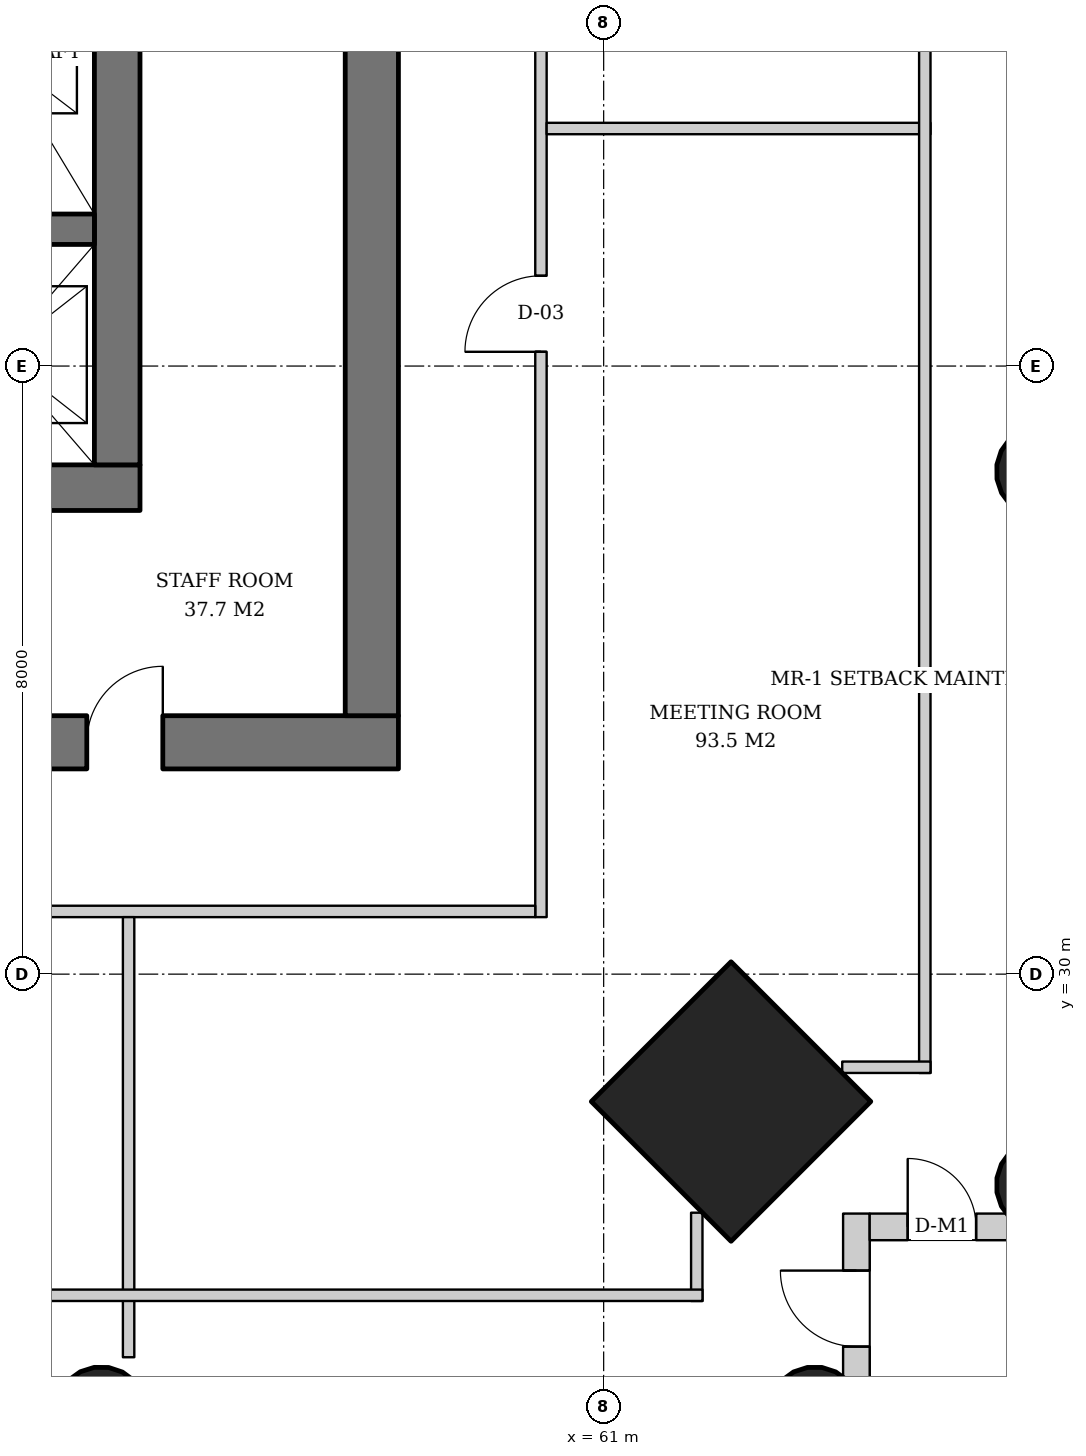
"""IFC4 building model, lengths in metres.
Left out: names, types, materials, properties, quantities, classifications, styles, units other than length and angle.
Written with IfcOpenShell. Run it as: python <this file> out.ifc"""

import sys

from ifc_helpers import new_model, si_unit, direction, frame, frame_2d, origin, origin_2d, place, context, subcontext, project, spatial, rectangle, hollow_circle, extrude, element, fill, save


model = new_model("IFC4")
c1 = context("Model", 3, precision=1e-05, world=origin(), true_north=direction((0.0, 1.0)))
c2 = subcontext(c1, "Body", "Model", "MODEL_VIEW")
j1 = project(units=[si_unit("LENGTHUNIT", "METRE"), si_unit("PLANEANGLEUNIT", "RADIAN")], contexts=[c1])
p1 = place(None, origin())
s1 = spatial("IfcSite", under=j1, at=p1, CompositionType="ELEMENT")
p2 = place(p1, origin())
s2 = spatial("IfcBuilding", under=s1, at=p2, CompositionType="ELEMENT")
p3 = place(p2, frame((0.0, 0.0, 89.4)))
s3 = spatial("IfcBuildingStorey", under=s2, at=p3, CompositionType="ELEMENT", Elevation=89.4)
p4 = place(p3, frame((66.814, 27.186, 0.0), z_axis=(-0.031898107953, 0.031898107953, 0.998981992539), x_axis=(-0.707106781187, -0.707106781187, 0.0)))
e1 = element("IfcColumn", 1, at=p4, inside=s3, PredefinedType="COLUMN", context=c2, shape_type="SweptSolid", body=[
    extrude(hollow_circle(Radius=0.61, WallThickness=0.04, at=origin_2d()), origin(), (0.0, 0.0, 1.0), 3.804),
])
p5 = place(p3, frame((66.814, 36.593, 0.0), z_axis=(-0.031910269556, 0.015987237665, 0.999362868496), x_axis=(-0.447933021895, -0.894067115991, 0.0)))
e2 = element("IfcColumn", 2, at=p5, inside=s3, PredefinedType="COLUMN", context=c2, shape_type="SweptSolid", body=[
    extrude(hollow_circle(Radius=0.61, WallThickness=0.04, at=origin_2d()), origin(), (0.0, 0.0, 1.0), 3.802),
])
p6 = place(p3, frame((62.714, 28.286, 0.0), z_axis=(-0.031962158256, 0.031962158256, 0.998977898093), x_axis=(-0.707106781187, -0.707106781187, 0.0)))
e3 = element("IfcColumn", 3, at=p6, inside=s3, PredefinedType="COLUMN", context=c2, shape_type="SweptSolid", body=[
    extrude(rectangle(XDim=2.6, YDim=2.6, at=origin_2d()), origin(), (0.0, 0.0, 1.0), 3.804),
])
p7 = place(p3, frame((63.814, 24.186, 0.0), z_axis=(-0.031898107953, 0.031898107953, 0.998981992539), x_axis=(-0.707106781187, -0.707106781187, 0.0)))
e4 = element("IfcColumn", 4, at=p7, inside=s3, PredefinedType="COLUMN", context=c2, shape_type="SweptSolid", body=[
    extrude(hollow_circle(Radius=0.61, WallThickness=0.04, at=origin_2d()), origin(), (0.0, 0.0, 1.0), 3.804),
])
p8 = place(p3, frame((54.407, 24.186, 0.0), z_axis=(-0.015987237665, 0.031910269556, 0.999362868496), x_axis=(-0.894067115991, -0.447933021895, 0.0)))
e5 = element("IfcColumn", 5, at=p8, inside=s3, PredefinedType="COLUMN", context=c2, shape_type="SweptSolid", body=[
    extrude(hollow_circle(Radius=0.61, WallThickness=0.04, at=origin_2d()), origin(), (0.0, 0.0, 1.0), 3.802),
])
p9 = place(p3, frame((35.1, 36.4, 0.0), z_axis=(0.0, 0.0, 1.0), x_axis=(1.0, 0.0, 0.0)))
e6 = element("IfcWall", 6, at=p9, inside=s3, PredefinedType="SHEAR", context=c2, shape_type="SweptSolid", body=[
    extrude(rectangle(XDim=19.8, YDim=0.6, at=frame_2d((9.9, 0.0))), origin(), (0.0, 0.0, 1.0), 3.8),
])
p10 = place(p9, frame((3.9, 0.0, 0.0)))
e7 = element("IfcOpeningElement", 7, at=p10, cuts=e6, PredefinedType="OPENING", context=c2, shape_type="SweptSolid", body=[
    extrude(rectangle(XDim=1.0, YDim=2.1, at=frame_2d((0.5, 1.05))), frame((0.0, 0.31, 0.0), z_axis=(0.0, -1.0, 0.0), x_axis=(1.0, 0.0, 0.0)), (0.0, 0.0, 1.0), 0.62),
])
p11 = place(p9, frame((15.35, 0.0, 0.0)))
e8 = element("IfcOpeningElement", 8, at=p11, cuts=e6, PredefinedType="OPENING", context=c2, shape_type="SweptSolid", body=[
    extrude(rectangle(XDim=1.0, YDim=2.1, at=frame_2d((0.5, 1.05))), frame((0.0, 0.31, 0.0), z_axis=(0.0, -1.0, 0.0), x_axis=(1.0, 0.0, 0.0)), (0.0, 0.0, 1.0), 0.62),
])
p12 = place(p3, frame((54.6, 36.7, 0.0), z_axis=(0.0, 0.0, 1.0), x_axis=(0.0, 1.0, 0.0)))
e9 = element("IfcWall", 9, at=p12, inside=s3, PredefinedType="SHEAR", context=c2, shape_type="SweptSolid", body=[
    extrude(rectangle(XDim=18.6, YDim=0.6, at=frame_2d((9.3, 0.0))), origin(), (0.0, 0.0, 1.0), 3.8),
])
p13 = place(p12, frame((8.4, 0.0, 0.0)))
e10 = element("IfcOpeningElement", 10, at=p13, cuts=e9, PredefinedType="OPENING", context=c2, shape_type="SweptSolid", body=[
    extrude(rectangle(XDim=1.8, YDim=2.4, at=frame_2d((0.9, 1.2))), frame((0.0, 0.31, 0.0), z_axis=(0.0, -1.0, 0.0), x_axis=(1.0, 0.0, 0.0)), (0.0, 0.0, 1.0), 0.62),
])
p14 = place(p3, frame((31.7, 33.05, 0.0), z_axis=(0.0, 0.0, 1.0), x_axis=(1.0, 0.0, 0.0)))
e11 = element("IfcWall", 11, at=p14, inside=s3, PredefinedType="SHEAR", context=c2, shape_type="SweptSolid", body=[
    extrude(rectangle(XDim=26.6, YDim=0.7, at=frame_2d((13.3, 0.0))), origin(), (0.0, 0.0, 1.0), 3.8),
])
p15 = place(p14, frame((7.3, 0.0, 0.0)))
e12 = element("IfcOpeningElement", 12, at=p15, cuts=e11, PredefinedType="OPENING", context=c2, shape_type="SweptSolid", body=[
    extrude(rectangle(XDim=1.0, YDim=2.1, at=frame_2d((0.5, 1.05))), frame((0.0, 0.36, 0.0), z_axis=(0.0, -1.0, 0.0), x_axis=(1.0, 0.0, 0.0)), (0.0, 0.0, 1.0), 0.72),
])
p16 = place(p14, frame((18.75, 0.0, 0.0)))
e13 = element("IfcOpeningElement", 13, at=p16, cuts=e11, PredefinedType="OPENING", context=c2, shape_type="SweptSolid", body=[
    extrude(rectangle(XDim=1.0, YDim=2.1, at=frame_2d((0.5, 1.05))), frame((0.0, 0.36, 0.0), z_axis=(0.0, -1.0, 0.0), x_axis=(1.0, 0.0, 0.0)), (0.0, 0.0, 1.0), 0.72),
])
p17 = place(p14, frame((3.2, 0.0, 0.0)))
e14 = element("IfcOpeningElement", 14, at=p17, cuts=e11, PredefinedType="OPENING", context=c2, shape_type="SweptSolid", body=[
    extrude(rectangle(XDim=1.0, YDim=2.1, at=frame_2d((0.5, 1.05))), frame((0.0, 0.36, 0.0), z_axis=(0.0, -1.0, 0.0), x_axis=(1.0, 0.0, 0.0)), (0.0, 0.0, 1.0), 0.72),
])
p18 = place(p14, frame((10.42, 0.0, 0.0)))
e15 = element("IfcOpeningElement", 15, at=p18, cuts=e11, PredefinedType="OPENING", context=c2, shape_type="SweptSolid", body=[
    extrude(rectangle(XDim=1.0, YDim=2.1, at=frame_2d((0.5, 1.05))), frame((0.0, 0.36, 0.0), z_axis=(0.0, -1.0, 0.0), x_axis=(1.0, 0.0, 0.0)), (0.0, 0.0, 1.0), 0.72),
])
p19 = place(p14, frame((14.46, 0.0, 0.0)))
e16 = element("IfcOpeningElement", 16, at=p19, cuts=e11, PredefinedType="OPENING", context=c2, shape_type="SweptSolid", body=[
    extrude(rectangle(XDim=1.0, YDim=2.1, at=frame_2d((0.5, 1.05))), frame((0.0, 0.36, 0.0), z_axis=(0.0, -1.0, 0.0), x_axis=(1.0, 0.0, 0.0)), (0.0, 0.0, 1.0), 0.72),
])
p20 = place(p14, frame((22.5, 0.0, 0.0)))
e17 = element("IfcOpeningElement", 17, at=p20, cuts=e11, PredefinedType="OPENING", context=c2, shape_type="SweptSolid", body=[
    extrude(rectangle(XDim=1.0, YDim=2.1, at=frame_2d((0.5, 1.05))), frame((0.0, 0.36, 0.0), z_axis=(0.0, -1.0, 0.0), x_axis=(1.0, 0.0, 0.0)), (0.0, 0.0, 1.0), 0.72),
])
p21 = place(p3, frame((57.95, 33.4, 0.0), z_axis=(0.0, 0.0, 1.0), x_axis=(0.0, 1.0, 0.0)))
e18 = element("IfcWall", 18, at=p21, inside=s3, PredefinedType="SHEAR", context=c2, shape_type="SweptSolid", body=[
    extrude(rectangle(XDim=25.2, YDim=0.7, at=frame_2d((12.6, 0.0))), origin(), (0.0, 0.0, 1.0), 3.8),
])
p22 = place(p21, frame((11.7, 0.0, 0.0)))
e19 = element("IfcOpeningElement", 19, at=p22, cuts=e18, PredefinedType="OPENING", context=c2, shape_type="SweptSolid", body=[
    extrude(rectangle(XDim=1.8, YDim=2.4, at=frame_2d((0.9, 1.2))), frame((0.0, 0.36, 0.0), z_axis=(0.0, -1.0, 0.0), x_axis=(1.0, 0.0, 0.0)), (0.0, 0.0, 1.0), 0.72),
])
p23 = place(p3, frame((35.7, 39.8, 0.0), z_axis=(0.0, 0.0, 1.0), x_axis=(1.0, 0.0, 0.0)))
e20 = element("IfcWall", 20, at=p23, inside=s3, PredefinedType="SHEAR", context=c2, shape_type="SweptSolid", body=[
    extrude(rectangle(XDim=18.6, YDim=0.4, at=frame_2d((9.3, 0.0))), origin(), (0.0, 0.0, 1.0), 3.8),
])
p24 = place(p3, frame((64.325, 23.5, 0.0), z_axis=(0.0, 0.0, 1.0), x_axis=(0.0, 1.0, 0.0)))
e21 = element("IfcWall", 21, at=p24, inside=s3, PredefinedType="SOLIDWALL", context=c2, shape_type="SweptSolid", body=[
    extrude(rectangle(XDim=3.35, YDim=0.35, at=frame_2d((1.675, 0.0))), origin(), (0.0, 0.0, 1.0), 3.62),
])
p25 = place(p24, frame((1.6, 0.0, 0.0)))
e22 = element("IfcOpeningElement", 22, at=p25, cuts=e21, PredefinedType="OPENING", context=c2, shape_type="SweptSolid", body=[
    extrude(rectangle(XDim=1.0, YDim=2.4, at=frame_2d((0.5, 1.2))), frame((0.0, 0.185, 0.0), z_axis=(0.0, -1.0, 0.0), x_axis=(1.0, 0.0, 0.0)), (0.0, 0.0, 1.0), 0.37),
])
p26 = place(p3, frame((64.5, 26.675, 0.0), z_axis=(0.0, 0.0, 1.0), x_axis=(1.0, 0.0, 0.0)))
e23 = element("IfcWall", 23, at=p26, inside=s3, PredefinedType="SOLIDWALL", context=c2, shape_type="SweptSolid", body=[
    extrude(rectangle(XDim=3.0, YDim=0.35, at=frame_2d((1.5, 0.0))), origin(), (0.0, 0.0, 1.0), 3.62),
])
p27 = place(p26, frame((0.5, 0.0, 0.0)))
e24 = element("IfcOpeningElement", 24, at=p27, cuts=e23, PredefinedType="OPENING", context=c2, shape_type="SweptSolid", body=[
    extrude(rectangle(XDim=0.9, YDim=2.1, at=frame_2d((0.45, 1.05))), frame((0.0, 0.185, 0.0), z_axis=(0.0, -1.0, 0.0), x_axis=(1.0, 0.0, 0.0)), (0.0, 0.0, 1.0), 0.37),
])
p28 = place(p3, frame((60.175, 30.75, 0.0), z_axis=(0.0, 0.0, 1.0), x_axis=(0.0, 1.0, 0.0)))
e25 = element("IfcWall", 25, at=p28, inside=s3, PredefinedType="PARTITIONING", context=c2, shape_type="SweptSolid", body=[
    extrude(rectangle(XDim=30.35, YDim=0.15, at=frame_2d((15.175, 0.0))), origin(), (0.0, 0.0, 1.0), 2.612),
])
p29 = place(p28, frame((7.438, 0.0, 0.0)))
e26 = element("IfcOpeningElement", 26, at=p29, cuts=e25, PredefinedType="OPENING", context=c2, shape_type="SweptSolid", body=[
    extrude(rectangle(XDim=1.0, YDim=2.1, at=frame_2d((0.5, 1.05))), frame((0.0, 0.085, 0.0), z_axis=(0.0, -1.0, 0.0), x_axis=(1.0, 0.0, 0.0)), (0.0, 0.0, 1.0), 0.17),
])
p30 = place(p28, frame((11.913, 0.0, 0.0)))
e27 = element("IfcOpeningElement", 27, at=p30, cuts=e25, PredefinedType="OPENING", context=c2, shape_type="SweptSolid", body=[
    extrude(rectangle(XDim=1.8, YDim=2.4, at=frame_2d((0.9, 1.2))), frame((0.0, 0.085, 0.0), z_axis=(0.0, -1.0, 0.0), x_axis=(1.0, 0.0, 0.0)), (0.0, 0.0, 1.0), 0.17),
])
p31 = place(p28, frame((16.788, 0.0, 0.0)))
e28 = element("IfcOpeningElement", 28, at=p31, cuts=e25, PredefinedType="OPENING", context=c2, shape_type="SweptSolid", body=[
    extrude(rectangle(XDim=1.8, YDim=2.4, at=frame_2d((0.9, 1.2))), frame((0.0, 0.085, 0.0), z_axis=(0.0, -1.0, 0.0), x_axis=(1.0, 0.0, 0.0)), (0.0, 0.0, 1.0), 0.17),
])
p32 = place(p3, frame((60.25, 41.125, 0.0), z_axis=(0.0, 0.0, 1.0), x_axis=(1.0, 0.0, 0.0)))
e29 = element("IfcWall", 29, at=p32, inside=s3, PredefinedType="PARTITIONING", context=c2, shape_type="SweptSolid", body=[
    extrude(rectangle(XDim=5.05, YDim=0.15, at=frame_2d((2.525, 0.0))), origin(), (0.0, 0.0, 1.0), 3.62),
])
p33 = place(p3, frame((29.75, 30.825, 0.0), z_axis=(0.0, 0.0, 1.0), x_axis=(1.0, 0.0, 0.0)))
e30 = element("IfcWall", 30, at=p33, inside=s3, PredefinedType="PARTITIONING", context=c2, shape_type="SweptSolid", body=[
    extrude(rectangle(XDim=30.35, YDim=0.15, at=frame_2d((15.175, 0.0))), origin(), (0.0, 0.0, 1.0), 2.612),
])
p34 = place(p33, frame((7.438, 0.0, 0.0)))
e31 = element("IfcOpeningElement", 31, at=p34, cuts=e30, PredefinedType="OPENING", context=c2, shape_type="SweptSolid", body=[
    extrude(rectangle(XDim=1.0, YDim=2.1, at=frame_2d((0.5, 1.05))), frame((0.0, 0.085, 0.0), z_axis=(0.0, -1.0, 0.0), x_axis=(1.0, 0.0, 0.0)), (0.0, 0.0, 1.0), 0.17),
])
p35 = place(p33, frame((12.312, 0.0, 0.0)))
e32 = element("IfcOpeningElement", 32, at=p35, cuts=e30, PredefinedType="OPENING", context=c2, shape_type="SweptSolid", body=[
    extrude(rectangle(XDim=1.0, YDim=2.1, at=frame_2d((0.5, 1.05))), frame((0.0, 0.085, 0.0), z_axis=(0.0, -1.0, 0.0), x_axis=(1.0, 0.0, 0.0)), (0.0, 0.0, 1.0), 0.17),
])
p36 = place(p33, frame((17.188, 0.0, 0.0)))
e33 = element("IfcOpeningElement", 33, at=p36, cuts=e30, PredefinedType="OPENING", context=c2, shape_type="SweptSolid", body=[
    extrude(rectangle(XDim=1.0, YDim=2.1, at=frame_2d((0.5, 1.05))), frame((0.0, 0.085, 0.0), z_axis=(0.0, -1.0, 0.0), x_axis=(1.0, 0.0, 0.0)), (0.0, 0.0, 1.0), 0.17),
])
p37 = place(p33, frame((22.062, 0.0, 0.0)))
e34 = element("IfcOpeningElement", 34, at=p37, cuts=e30, PredefinedType="OPENING", context=c2, shape_type="SweptSolid", body=[
    extrude(rectangle(XDim=1.0, YDim=2.1, at=frame_2d((0.5, 1.05))), frame((0.0, 0.085, 0.0), z_axis=(0.0, -1.0, 0.0), x_axis=(1.0, 0.0, 0.0)), (0.0, 0.0, 1.0), 0.17),
])
p38 = place(p3, frame((54.75, 30.75, 0.0), z_axis=(0.0, 0.0, 1.0), x_axis=(0.0, -1.0, 0.0)))
e35 = element("IfcWall", 35, at=p38, inside=s3, PredefinedType="PARTITIONING", context=c2, shape_type="SweptSolid", body=[
    extrude(rectangle(XDim=5.79, YDim=0.15, at=frame_2d((2.895, 0.0))), origin(), (0.0, 0.0, 1.0), 3.62),
])
p39 = place(p3, frame((65.225, 63.3, 0.0), z_axis=(0.0, 0.0, 1.0), x_axis=(0.0, -1.0, 0.0)))
e36 = element("IfcWall", 36, at=p39, inside=s3, PredefinedType="PARTITIONING", context=c2, shape_type="SweptSolid", body=[
    extrude(rectangle(XDim=34.6, YDim=0.15, at=frame_2d((17.3, 0.0))), origin(), (0.0, 0.0, 1.0), 2.612),
])
for number, where, z_axis, x_axis in (
    (37, (65.3, 28.775, 0.0), (0.0, 0.0, 1.0), (-1.0, 0.0, 0.0)),
    (38, (62.225, 26.862, 0.0), (0.0, 0.0, 1.0), (0.0, -1.0, 0.0)),
):
    element("IfcWall", number, at=place(p3, frame(where, z_axis=z_axis, x_axis=x_axis)), inside=s3, PredefinedType="PARTITIONING", context=c2, shape_type="SweptSolid", body=[
        extrude(rectangle(XDim=1.162, YDim=0.15, at=frame_2d((0.581, 0.0))), origin(), (0.0, 0.0, 1.0), 3.62),
    ])
p40 = place(p3, frame((62.3, 25.775, 0.0), z_axis=(0.0, 0.0, 1.0), x_axis=(-1.0, 0.0, 0.0)))
e39 = element("IfcWall", 39, at=p40, inside=s3, PredefinedType="PARTITIONING", context=c2, shape_type="SweptSolid", body=[
    extrude(rectangle(XDim=34.6, YDim=0.15, at=frame_2d((17.3, 0.0))), origin(), (0.0, 0.0, 1.0), 2.612),
])
p41 = place(p27, origin())
e40 = element("IfcDoor", 40, at=p41, inside=s3, OperationType="SINGLE_SWING_LEFT", PredefinedType="DOOR", context=c2, shape_type="SweptSolid", body=[
    extrude(rectangle(XDim=0.9, YDim=2.1, at=frame_2d((0.45, 1.05))), frame((0.0, 0.025, 0.0), z_axis=(0.0, -1.0, 0.0), x_axis=(1.0, 0.0, 0.0)), (0.0, 0.0, 1.0), 0.05),
])
fill(e24, e40)
p42 = place(p25, origin())
e41 = element("IfcDoor", 41, at=p42, inside=s3, OperationType="SINGLE_SWING_RIGHT", PredefinedType="DOOR", context=c2, shape_type="SweptSolid", body=[
    extrude(rectangle(XDim=1.0, YDim=2.4, at=frame_2d((0.5, 1.2))), frame((0.0, 0.025, 0.0), z_axis=(0.0, -1.0, 0.0), x_axis=(1.0, 0.0, 0.0)), (0.0, 0.0, 1.0), 0.05),
])
fill(e22, e41)
p43 = place(p20, origin())
e42 = element("IfcDoor", 42, at=p43, inside=s3, OperationType="SINGLE_SWING_RIGHT", PredefinedType="DOOR", context=c2, shape_type="SweptSolid", body=[
    extrude(rectangle(XDim=1.0, YDim=2.1, at=frame_2d((0.5, 1.05))), frame((0.0, 0.34, 0.0), z_axis=(0.0, -1.0, 0.0), x_axis=(1.0, 0.0, 0.0)), (0.0, 0.0, 1.0), 0.05),
])
fill(e17, e42)
p44 = place(p29, origin())
e43 = element("IfcDoor", 43, at=p44, inside=s3, OperationType="SINGLE_SWING_LEFT", PredefinedType="DOOR", context=c2, shape_type="SweptSolid", body=[
    extrude(rectangle(XDim=1.0, YDim=2.1, at=frame_2d((0.5, 1.05))), frame((0.0, 0.025, 0.0), z_axis=(0.0, -1.0, 0.0), x_axis=(1.0, 0.0, 0.0)), (0.0, 0.0, 1.0), 0.05),
])
fill(e26, e43)
save(model, sys.argv[1])
